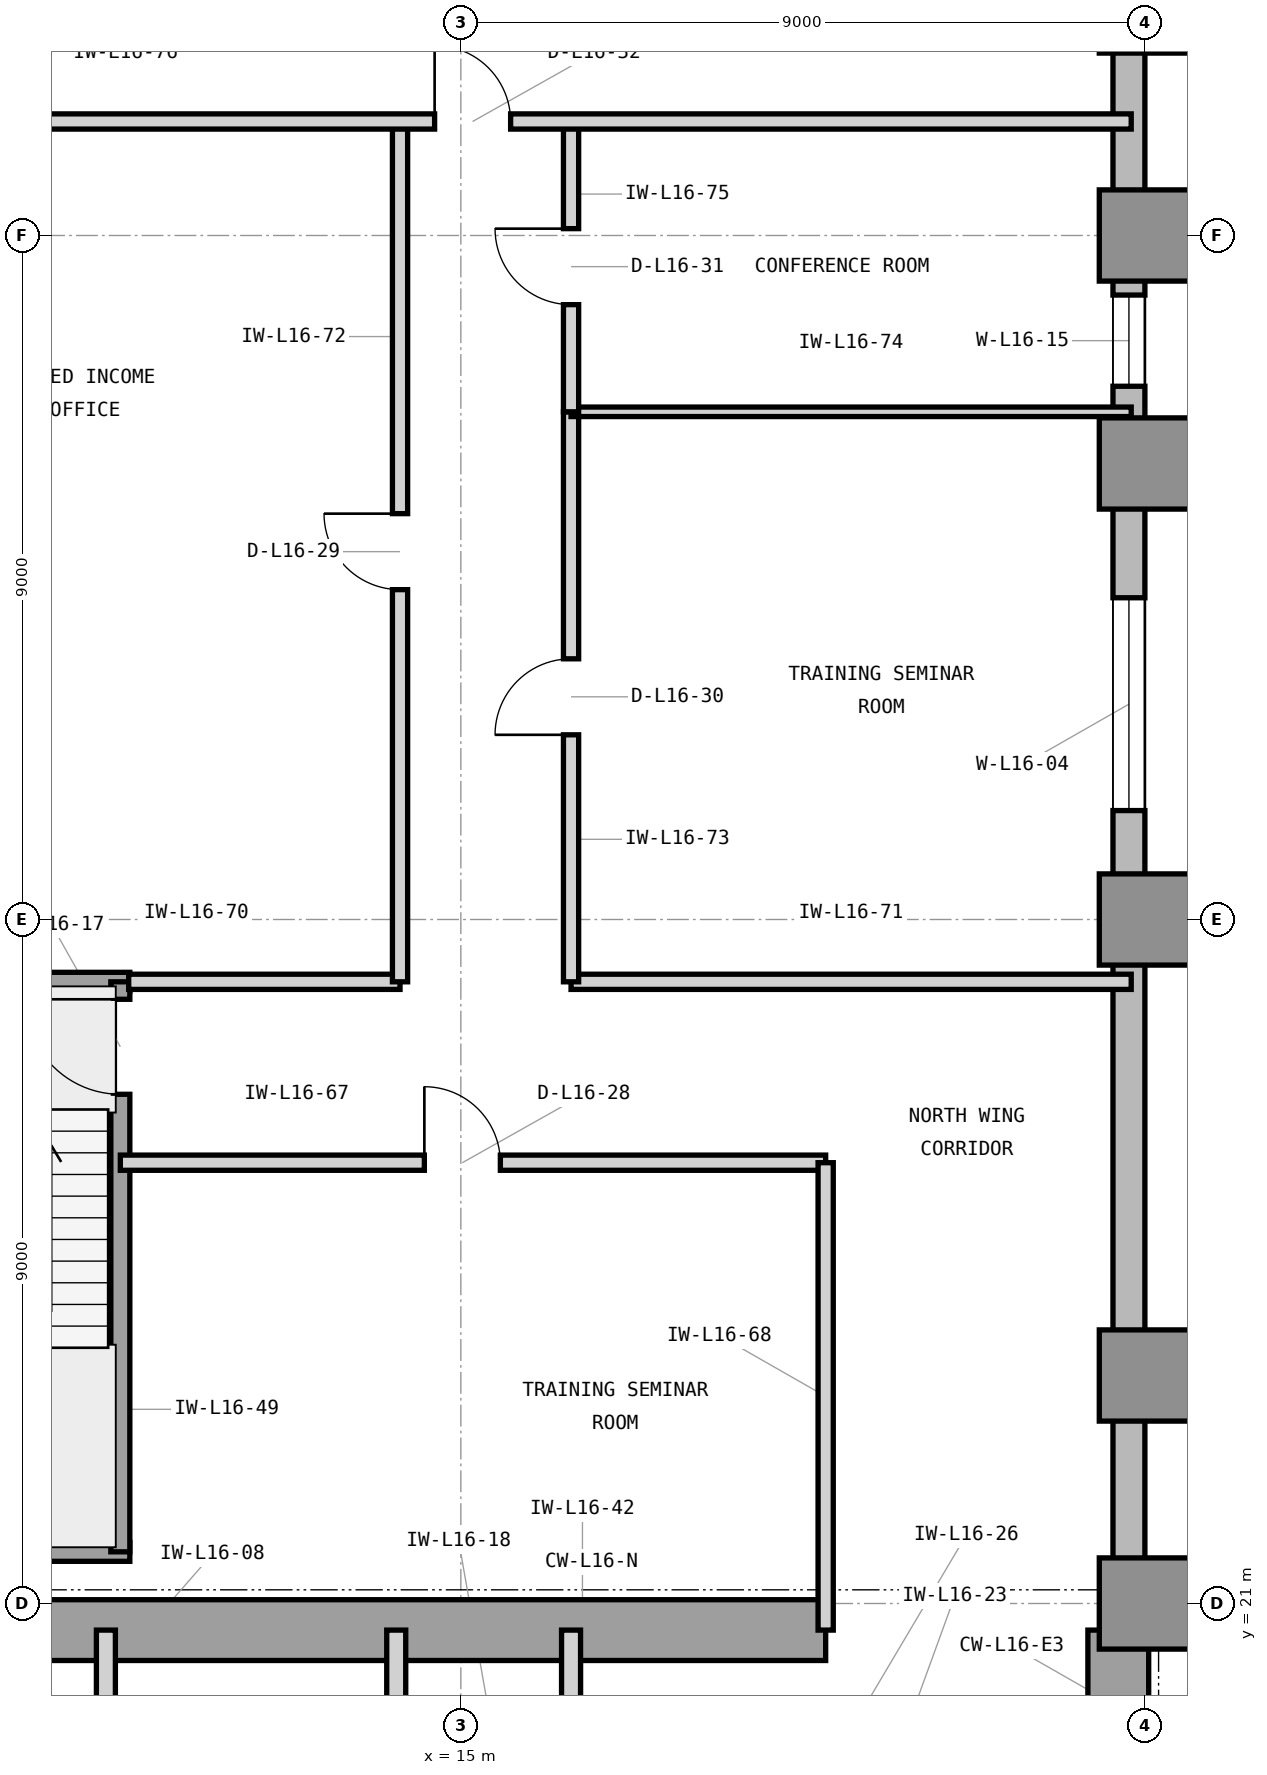
"""IFC4 building model, lengths in metres.
Left out: names, types, materials, properties, quantities, classifications, styles, units other than length and angle.
Written with IfcOpenShell. Run it as: python <this file> out.ifc"""

import sys

from ifc_helpers import new_model, si_unit, direction, frame, frame_2d, origin, origin_2d, place, context, subcontext, project, spatial, rectangle, extrude, element, fill, save


model = new_model("IFC4")
c1 = context("Model", 3, precision=1e-05, world=origin(), true_north=direction((0.0, 1.0)))
c2 = subcontext(c1, "Body", "Model", "MODEL_VIEW")
j1 = project(units=[si_unit("LENGTHUNIT", "METRE"), si_unit("PLANEANGLEUNIT", "RADIAN")], contexts=[c1])
p1 = place(None, origin())
s1 = spatial("IfcSite", under=j1, at=p1, CompositionType="ELEMENT")
p2 = place(p1, origin())
s2 = spatial("IfcBuilding", under=s1, at=p2, CompositionType="ELEMENT")
p3 = place(p2, frame((0.0, 0.0, 72.0)))
s3 = spatial("IfcBuildingStorey", under=s2, at=p3, CompositionType="ELEMENT", Elevation=72.0)
p4 = place(p3, frame((7.475, 20.65, 0.0), z_axis=(0.0, 0.0, 1.0), x_axis=(1.0, 0.0, 0.0)))
e1 = element("IfcWall", 1, at=p4, inside=s3, PredefinedType="SHEAR", context=c2, shape_type="SweptSolid", body=[
    extrude(rectangle(XDim=12.325, YDim=0.8, at=frame_2d((6.163, 0.0))), origin(), (0.0, 0.0, 1.0), 4.2),
])
p5 = place(p3, frame((23.65, 16.6, 0.0), z_axis=(0.0, 0.0, 1.0), x_axis=(0.0, 1.0, 0.0)))
e2 = element("IfcWall", 2, at=p5, inside=s3, PredefinedType="SHEAR", context=c2, shape_type="SweptSolid", body=[
    extrude(rectangle(XDim=4.05, YDim=0.8, at=frame_2d((2.025, 0.0))), origin(), (0.0, 0.0, 1.0), 4.2),
])
for number, where, z_axis, x_axis in (
    (3, (24.0, 21.0, 0.0), (0.0, 0.0, 1.0), (1.0, 0.0, 0.0)),
    (4, (24.0, 24.0, 0.0), (0.0, 0.0, 1.0), (1.0, 0.0, 0.0)),
    (5, (24.0, 30.0, 0.0), (0.0, 0.0, 1.0), (1.0, 0.0, 0.0)),
    (6, (24.0, 36.0, 0.0), (0.0, 0.0, 1.0), (1.0, 0.0, 0.0)),
    (7, (24.0, 39.0, 0.0), (0.0, 0.0, 1.0), (1.0, 0.0, 0.0)),
    (8, (24.0, 42.0, 0.0), (0.0, 0.0, 1.0), (1.0, 0.0, 0.0)),
):
    element("IfcColumn", number, at=place(p3, frame(where, z_axis=z_axis, x_axis=x_axis)), inside=s3, PredefinedType="COLUMN", context=c2, shape_type="SweptSolid", body=[
        extrude(rectangle(XDim=1.2, YDim=1.2, at=origin_2d()), origin(), (0.0, 0.0, 1.0), 4.2),
    ])
p6 = place(p3, frame((64.4, 20.79, 0.0), z_axis=(0.0, 0.0, 1.0), x_axis=(-1.0, 0.0, 0.0)))
e9 = element("IfcWall", 9, at=p6, inside=s3, PredefinedType="STANDARD", context=c2, shape_type="SweptSolid", body=[
    extrude(rectangle(XDim=40.4, YDim=0.42, at=frame_2d((20.2, 0.0))), origin(), (0.0, 0.0, 1.0), 3.98),
])
p7 = place(p6, frame((26.375, 0.0, 0.85)))
e10 = element("IfcOpeningElement", 10, at=p7, cuts=e9, PredefinedType="OPENING", context=c2, shape_type="SweptSolid", body=[
    extrude(rectangle(XDim=2.8, YDim=2.45, at=frame_2d((1.4, 1.225))), frame((0.0, 0.22, 0.0), z_axis=(0.0, -1.0, 0.0), x_axis=(1.0, 0.0, 0.0)), (0.0, 0.0, 1.0), 0.44),
])
p8 = place(p6, frame((38.222, 0.0, 0.85)))
e11 = element("IfcOpeningElement", 11, at=p8, cuts=e9, PredefinedType="OPENING", context=c2, shape_type="SweptSolid", body=[
    extrude(rectangle(XDim=1.2, YDim=2.45, at=frame_2d((0.6, 1.225))), frame((0.0, 0.22, 0.0), z_axis=(0.0, -1.0, 0.0), x_axis=(1.0, 0.0, 0.0)), (0.0, 0.0, 1.0), 0.44),
])
p9 = place(p6, frame((32.536, 0.0, 0.85)))
e12 = element("IfcOpeningElement", 12, at=p9, cuts=e9, PredefinedType="OPENING", context=c2, shape_type="SweptSolid", body=[
    extrude(rectangle(XDim=2.8, YDim=2.45, at=frame_2d((1.4, 1.225))), frame((0.0, 0.22, 0.0), z_axis=(0.0, -1.0, 0.0), x_axis=(1.0, 0.0, 0.0)), (0.0, 0.0, 1.0), 0.44),
])
p10 = place(p6, frame((17.386, 0.0, 0.85)))
e13 = element("IfcOpeningElement", 13, at=p10, cuts=e9, PredefinedType="OPENING", context=c2, shape_type="SweptSolid", body=[
    extrude(rectangle(XDim=2.8, YDim=2.45, at=frame_2d((1.4, 1.225))), frame((0.0, 0.22, 0.0), z_axis=(0.0, -1.0, 0.0), x_axis=(1.0, 0.0, 0.0)), (0.0, 0.0, 1.0), 0.44),
])
p11 = place(p3, frame((23.79, 21.0, 0.0), z_axis=(0.0, 0.0, 1.0), x_axis=(0.0, 1.0, 0.0)))
e14 = element("IfcWall", 14, at=p11, inside=s3, PredefinedType="STANDARD", context=c2, shape_type="SweptSolid", body=[
    extrude(rectangle(XDim=28.4, YDim=0.42, at=frame_2d((14.2, 0.0))), origin(), (0.0, 0.0, 1.0), 3.98),
])
p12 = place(p11, frame((10.433, 0.0, 0.85)))
e15 = element("IfcOpeningElement", 15, at=p12, cuts=e14, PredefinedType="OPENING", context=c2, shape_type="SweptSolid", body=[
    extrude(rectangle(XDim=2.8, YDim=2.45, at=frame_2d((1.4, 1.225))), frame((0.0, 0.22, 0.0), z_axis=(0.0, -1.0, 0.0), x_axis=(1.0, 0.0, 0.0)), (0.0, 0.0, 1.0), 0.44),
])
p13 = place(p11, frame((16.016, 0.0, 0.85)))
e16 = element("IfcOpeningElement", 16, at=p13, cuts=e14, PredefinedType="OPENING", context=c2, shape_type="SweptSolid", body=[
    extrude(rectangle(XDim=1.2, YDim=2.45, at=frame_2d((0.6, 1.225))), frame((0.0, 0.22, 0.0), z_axis=(0.0, -1.0, 0.0), x_axis=(1.0, 0.0, 0.0)), (0.0, 0.0, 1.0), 0.44),
])
p14 = place(p3, frame((10.33, 19.45, 0.0), z_axis=(0.0, 0.0, 1.0), x_axis=(0.0, 1.0, 0.0)))
e17 = element("IfcWall", 17, at=p14, inside=s3, PredefinedType="PARTITIONING", context=c2, shape_type="SweptSolid", body=[
    extrude(rectangle(XDim=1.2, YDim=0.25, at=frame_2d((0.6, 0.0))), origin(), (0.0, 0.0, 1.0), 3.114),
])
for number, where, z_axis, x_axis in (
    (18, (14.15, 16.7, 0.0), (0.0, 0.0, 1.0), (0.0, 1.0, 0.0)),
    (19, (16.45, 16.7, 0.0), (0.0, 0.0, 1.0), (0.0, 1.0, 0.0)),
):
    element("IfcWall", number, at=place(p3, frame(where, z_axis=z_axis, x_axis=x_axis)), inside=s3, PredefinedType="PARTITIONING", context=c2, shape_type="SweptSolid", body=[
        extrude(rectangle(XDim=3.95, YDim=0.25, at=frame_2d((1.975, 0.0))), origin(), (0.0, 0.0, 1.0), 3.97),
    ])
for number, where, z_axis, x_axis in (
    (20, (6.555, 21.68, 0.0), (0.0, 0.0, 1.0), (1.0, 0.0, 0.0)),
    (21, (6.555, 29.18, 0.0), (0.0, 0.0, 1.0), (1.0, 0.0, 0.0)),
):
    element("IfcWall", number, at=place(p3, frame(where, z_axis=z_axis, x_axis=x_axis)), inside=s3, PredefinedType="SHEAR", context=c2, shape_type="SweptSolid", body=[
        extrude(rectangle(XDim=4.09, YDim=0.25, at=frame_2d((2.045, 0.0))), origin(), (0.0, 0.0, 1.0), 4.2),
    ])
p15 = place(p3, frame((10.52, 21.68, 0.0), z_axis=(0.0, 0.0, 1.0), x_axis=(0.0, 1.0, 0.0)))
e22 = element("IfcWall", 22, at=p15, inside=s3, PredefinedType="SHEAR", context=c2, shape_type="SweptSolid", body=[
    extrude(rectangle(XDim=7.5, YDim=0.25, at=frame_2d((3.75, 0.0))), origin(), (0.0, 0.0, 1.0), 4.2),
])
p16 = place(p15, frame((6.02, 0.0, 0.0)))
e23 = element("IfcOpeningElement", 23, at=p16, cuts=e22, PredefinedType="OPENING", context=c2, shape_type="SweptSolid", body=[
    extrude(rectangle(XDim=1.25, YDim=2.2, at=frame_2d((0.625, 1.1))), frame((0.0, 0.135, 0.0), z_axis=(0.0, -1.0, 0.0), x_axis=(1.0, 0.0, 0.0)), (0.0, 0.0, 1.0), 0.27),
])
p17 = place(p3, frame((10.52, 26.8, 0.0), z_axis=(0.0, 0.0, 1.0), x_axis=(1.0, 0.0, 0.0)))
e24 = element("IfcWall", 24, at=p17, inside=s3, PredefinedType="PARTITIONING", context=c2, shape_type="SweptSolid", body=[
    extrude(rectangle(XDim=9.28, YDim=0.2, at=frame_2d((4.64, 0.0))), origin(), (0.0, 0.0, 1.0), 3.97),
])
p18 = place(p17, frame((4.0, 0.0, 0.0)))
e25 = element("IfcOpeningElement", 25, at=p18, cuts=e24, PredefinedType="OPENING", context=c2, shape_type="SweptSolid", body=[
    extrude(rectangle(XDim=1.0, YDim=2.15, at=frame_2d((0.5, 1.075))), frame((0.0, 0.11, 0.0), z_axis=(0.0, -1.0, 0.0), x_axis=(1.0, 0.0, 0.0)), (0.0, 0.0, 1.0), 0.22),
])
p19 = place(p3, frame((19.8, 20.65, 0.0), z_axis=(0.0, 0.0, 1.0), x_axis=(0.0, 1.0, 0.0)))
e26 = element("IfcWall", 26, at=p19, inside=s3, PredefinedType="PARTITIONING", context=c2, shape_type="SweptSolid", body=[
    extrude(rectangle(XDim=6.15, YDim=0.2, at=frame_2d((3.075, 0.0))), origin(), (0.0, 0.0, 1.0), 3.97),
])
p20 = place(p3, frame((10.63, 29.18, 0.0), z_axis=(0.0, 0.0, 1.0), x_axis=(1.0, 0.0, 0.0)))
e27 = element("IfcWall", 27, at=p20, inside=s3, PredefinedType="PARTITIONING", context=c2, shape_type="SweptSolid", body=[
    extrude(rectangle(XDim=3.57, YDim=0.2, at=frame_2d((1.785, 0.0))), origin(), (0.0, 0.0, 1.0), 3.97),
])
p21 = place(p3, frame((16.45, 29.18, 0.0), z_axis=(0.0, 0.0, 1.0), x_axis=(1.0, 0.0, 0.0)))
e28 = element("IfcWall", 28, at=p21, inside=s3, PredefinedType="PARTITIONING", context=c2, shape_type="SweptSolid", body=[
    extrude(rectangle(XDim=7.37, YDim=0.2, at=frame_2d((3.685, 0.0))), origin(), (0.0, 0.0, 1.0), 3.97),
])
p22 = place(p3, frame((14.2, 29.18, 0.0), z_axis=(0.0, 0.0, 1.0), x_axis=(0.0, 1.0, 0.0)))
e29 = element("IfcWall", 29, at=p22, inside=s3, PredefinedType="PARTITIONING", context=c2, shape_type="SweptSolid", body=[
    extrude(rectangle(XDim=11.32, YDim=0.2, at=frame_2d((5.66, 0.0))), origin(), (0.0, 0.0, 1.0), 3.97),
])
p23 = place(p22, frame((5.16, 0.0, 0.0)))
e30 = element("IfcOpeningElement", 30, at=p23, cuts=e29, PredefinedType="OPENING", context=c2, shape_type="SweptSolid", body=[
    extrude(rectangle(XDim=1.0, YDim=2.15, at=frame_2d((0.5, 1.075))), frame((0.0, 0.11, 0.0), z_axis=(0.0, -1.0, 0.0), x_axis=(1.0, 0.0, 0.0)), (0.0, 0.0, 1.0), 0.22),
])
p24 = place(p3, frame((16.45, 29.18, 0.0), z_axis=(0.0, 0.0, 1.0), x_axis=(0.0, 1.0, 0.0)))
e31 = element("IfcWall", 31, at=p24, inside=s3, PredefinedType="PARTITIONING", context=c2, shape_type="SweptSolid", body=[
    extrude(rectangle(XDim=7.5, YDim=0.2, at=frame_2d((3.75, 0.0))), origin(), (0.0, 0.0, 1.0), 3.97),
])
p25 = place(p24, frame((3.25, 0.0, 0.0)))
e32 = element("IfcOpeningElement", 32, at=p25, cuts=e31, PredefinedType="OPENING", context=c2, shape_type="SweptSolid", body=[
    extrude(rectangle(XDim=1.0, YDim=2.15, at=frame_2d((0.5, 1.075))), frame((0.0, 0.11, 0.0), z_axis=(0.0, -1.0, 0.0), x_axis=(1.0, 0.0, 0.0)), (0.0, 0.0, 1.0), 0.22),
])
p26 = place(p3, frame((16.45, 36.68, 0.0), z_axis=(0.0, 0.0, 1.0), x_axis=(1.0, 0.0, 0.0)))
e33 = element("IfcWall", 33, at=p26, inside=s3, PredefinedType="PARTITIONING", context=c2, shape_type="SweptSolid", body=[
    extrude(rectangle(XDim=7.37, YDim=0.125, at=frame_2d((3.685, 0.0))), origin(), (0.0, 0.0, 1.0), 3.97),
])
p27 = place(p3, frame((16.45, 36.68, 0.0), z_axis=(0.0, 0.0, 1.0), x_axis=(0.0, 1.0, 0.0)))
e34 = element("IfcWall", 34, at=p27, inside=s3, PredefinedType="PARTITIONING", context=c2, shape_type="SweptSolid", body=[
    extrude(rectangle(XDim=3.82, YDim=0.2, at=frame_2d((1.91, 0.0))), origin(), (0.0, 0.0, 1.0), 3.97),
])
p28 = place(p27, frame((1.41, 0.0, 0.0)))
e35 = element("IfcOpeningElement", 35, at=p28, cuts=e34, PredefinedType="OPENING", context=c2, shape_type="SweptSolid", body=[
    extrude(rectangle(XDim=1.0, YDim=2.15, at=frame_2d((0.5, 1.075))), frame((0.0, 0.11, 0.0), z_axis=(0.0, -1.0, 0.0), x_axis=(1.0, 0.0, 0.0)), (0.0, 0.0, 1.0), 0.22),
])
p29 = place(p3, frame((6.18, 40.5, 0.0), z_axis=(0.0, 0.0, 1.0), x_axis=(1.0, 0.0, 0.0)))
e36 = element("IfcWall", 36, at=p29, inside=s3, PredefinedType="PARTITIONING", context=c2, shape_type="SweptSolid", body=[
    extrude(rectangle(XDim=17.64, YDim=0.2, at=frame_2d((8.82, 0.0))), origin(), (0.0, 0.0, 1.0), 3.97),
])
p30 = place(p29, frame((8.475, 0.0, 0.0)))
e37 = element("IfcOpeningElement", 37, at=p30, cuts=e36, PredefinedType="OPENING", context=c2, shape_type="SweptSolid", body=[
    extrude(rectangle(XDim=1.0, YDim=2.15, at=frame_2d((0.5, 1.075))), frame((0.0, 0.11, 0.0), z_axis=(0.0, -1.0, 0.0), x_axis=(1.0, 0.0, 0.0)), (0.0, 0.0, 1.0), 0.22),
])
p31 = place(p12, origin())
e38 = element("IfcWindow", 38, at=p31, inside=s3, PartitioningType="SINGLE_PANEL", PredefinedType="WINDOW", context=c2, shape_type="SweptSolid", body=[
    extrude(rectangle(XDim=2.8, YDim=2.45, at=frame_2d((1.4, 1.225))), frame((0.0, 0.11, 0.0), z_axis=(0.0, -1.0, 0.0), x_axis=(1.0, 0.0, 0.0)), (0.0, 0.0, 1.0), 0.06),
])
fill(e15, e38)
p32 = place(p16, origin())
e39 = element("IfcDoor", 39, at=p32, inside=s3, OperationType="SINGLE_SWING_RIGHT", PredefinedType="DOOR", context=c2, shape_type="SweptSolid", body=[
    extrude(rectangle(XDim=1.25, YDim=2.2, at=frame_2d((0.625, 1.1))), frame((0.0, 0.025, 0.0), z_axis=(0.0, -1.0, 0.0), x_axis=(1.0, 0.0, 0.0)), (0.0, 0.0, 1.0), 0.05),
])
fill(e23, e39)
p33 = place(p18, origin())
e40 = element("IfcDoor", 40, at=p33, inside=s3, OperationType="SINGLE_SWING_LEFT", PredefinedType="DOOR", context=c2, shape_type="SweptSolid", body=[
    extrude(rectangle(XDim=1.0, YDim=2.15, at=frame_2d((0.5, 1.075))), frame((0.0, 0.025, 0.0), z_axis=(0.0, -1.0, 0.0), x_axis=(1.0, 0.0, 0.0)), (0.0, 0.0, 1.0), 0.05),
])
fill(e25, e40)
p34 = place(p23, origin())
e41 = element("IfcDoor", 41, at=p34, inside=s3, OperationType="SINGLE_SWING_RIGHT", PredefinedType="DOOR", context=c2, shape_type="SweptSolid", body=[
    extrude(rectangle(XDim=1.0, YDim=2.15, at=frame_2d((0.5, 1.075))), frame((0.0, 0.025, 0.0), z_axis=(0.0, -1.0, 0.0), x_axis=(1.0, 0.0, 0.0)), (0.0, 0.0, 1.0), 0.05),
])
fill(e30, e41)
p35 = place(p25, origin())
e42 = element("IfcDoor", 42, at=p35, inside=s3, OperationType="SINGLE_SWING_LEFT", PredefinedType="DOOR", context=c2, shape_type="SweptSolid", body=[
    extrude(rectangle(XDim=1.0, YDim=2.15, at=frame_2d((0.5, 1.075))), frame((0.0, 0.025, 0.0), z_axis=(0.0, -1.0, 0.0), x_axis=(1.0, 0.0, 0.0)), (0.0, 0.0, 1.0), 0.05),
])
fill(e32, e42)
p36 = place(p28, origin())
e43 = element("IfcDoor", 43, at=p36, inside=s3, OperationType="SINGLE_SWING_RIGHT", PredefinedType="DOOR", context=c2, shape_type="SweptSolid", body=[
    extrude(rectangle(XDim=1.0, YDim=2.15, at=frame_2d((0.5, 1.075))), frame((0.0, 0.025, 0.0), z_axis=(0.0, -1.0, 0.0), x_axis=(1.0, 0.0, 0.0)), (0.0, 0.0, 1.0), 0.05),
])
fill(e35, e43)
p37 = place(p30, origin())
e44 = element("IfcDoor", 44, at=p37, inside=s3, OperationType="SINGLE_SWING_LEFT", PredefinedType="DOOR", context=c2, shape_type="SweptSolid", body=[
    extrude(rectangle(XDim=1.0, YDim=2.15, at=frame_2d((0.5, 1.075))), frame((0.0, 0.025, 0.0), z_axis=(0.0, -1.0, 0.0), x_axis=(1.0, 0.0, 0.0)), (0.0, 0.0, 1.0), 0.05),
])
fill(e37, e44)
p38 = place(p13, origin())
e45 = element("IfcWindow", 45, at=p38, inside=s3, PartitioningType="SINGLE_PANEL", PredefinedType="WINDOW", context=c2, shape_type="SweptSolid", body=[
    extrude(rectangle(XDim=1.2, YDim=2.45, at=frame_2d((0.6, 1.225))), frame((0.0, 0.11, 0.0), z_axis=(0.0, -1.0, 0.0), x_axis=(1.0, 0.0, 0.0)), (0.0, 0.0, 1.0), 0.06),
])
fill(e16, e45)
save(model, sys.argv[1])
